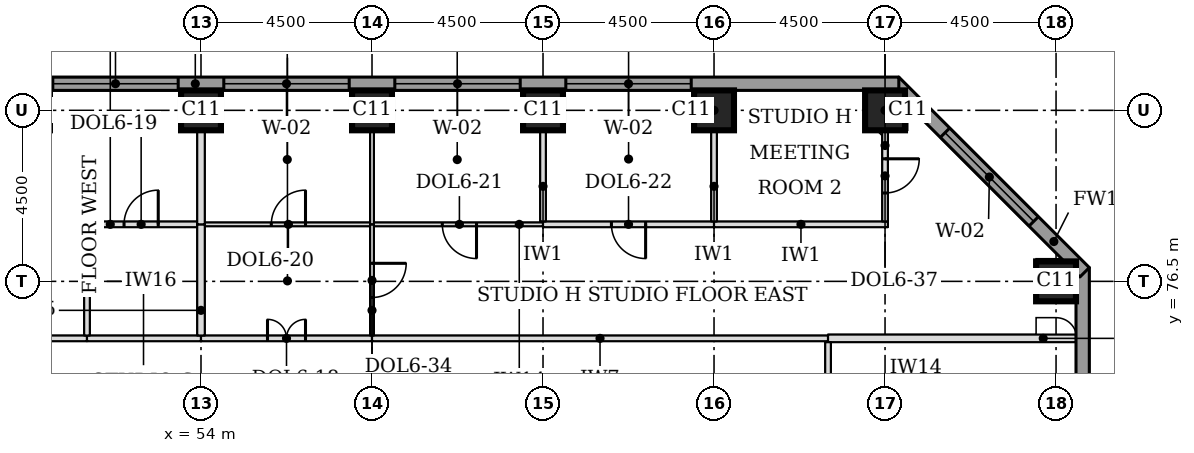
"""IFC4 building model, lengths in metres.
Left out: names, types, materials, properties, quantities, classifications, styles, units other than length and angle.
Written with IfcOpenShell. Run it as: python <this file> out.ifc"""

import sys

from ifc_helpers import new_model, si_unit, direction, frame, frame_2d, origin, origin_2d, place, context, subcontext, project, spatial, rectangle, extrude, element, fill, save


model = new_model("IFC4")
c1 = context("Model", 3, precision=1e-05, world=origin(), true_north=direction((0.0, 1.0)))
c2 = subcontext(c1, "Body", "Model", "MODEL_VIEW")
j1 = project(units=[si_unit("LENGTHUNIT", "METRE"), si_unit("PLANEANGLEUNIT", "RADIAN")], contexts=[c1])
p1 = place(None, origin())
s1 = spatial("IfcSite", under=j1, at=p1, CompositionType="ELEMENT")
p2 = place(p1, origin())
s2 = spatial("IfcBuilding", under=s1, at=p2, CompositionType="ELEMENT")
p3 = place(p2, frame((0.0, 0.0, 119.6)))
s3 = spatial("IfcBuildingStorey", under=s2, at=p3, CompositionType="ELEMENT", Elevation=119.6)
for number, where, z_axis, x_axis in (
    (1, (76.5, 76.5, 0.0), (0.0, 0.0, 1.0), (1.0, 0.0, 0.0)),
    (2, (54.0, 81.0, 0.0), (0.0, 0.0, 1.0), (1.0, 0.0, 0.0)),
    (3, (58.5, 81.0, 0.0), (0.0, 0.0, 1.0), (1.0, 0.0, 0.0)),
    (4, (63.0, 81.0, 0.0), (0.0, 0.0, 1.0), (1.0, 0.0, 0.0)),
    (5, (67.5, 81.0, 0.0), (0.0, 0.0, 1.0), (1.0, 0.0, 0.0)),
    (6, (72.0, 81.0, 0.0), (0.0, 0.0, 1.0), (1.0, 0.0, 0.0)),
):
    element("IfcColumn", number, at=place(p3, frame(where, z_axis=z_axis, x_axis=x_axis)), inside=s3, PredefinedType="COLUMN", context=c2, shape_type="SweptSolid", body=[
        extrude(rectangle(XDim=1.05, YDim=1.05, at=origin_2d()), origin(), (0.0, 0.0, 1.0), 3.7),
    ])
p4 = place(p3, frame((77.2, 44.638, 0.0), z_axis=(0.0, 0.0, 1.0), x_axis=(0.0, 1.0, 0.0)))
e7 = element("IfcWall", 7, at=p4, inside=s3, PredefinedType="STANDARD", context=c2, shape_type="SweptSolid", body=[
    extrude(rectangle(XDim=32.225, YDim=0.35, at=frame_2d((16.112, 0.0))), origin(), (0.0, 0.0, 1.0), 3.525),
])
p5 = place(p4, frame((5.462, 0.0, 0.9)))
e8 = element("IfcOpeningElement", 8, at=p5, cuts=e7, PredefinedType="OPENING", context=c2, shape_type="SweptSolid", body=[
    extrude(rectangle(XDim=3.3, YDim=1.9, at=frame_2d((1.65, 0.95))), frame((0.0, 0.185, 0.0), z_axis=(0.0, -1.0, 0.0), x_axis=(1.0, 0.0, 0.0)), (0.0, 0.0, 1.0), 0.37),
])
p6 = place(p4, frame((9.962, 0.0, 0.9)))
e9 = element("IfcOpeningElement", 9, at=p6, cuts=e7, PredefinedType="OPENING", context=c2, shape_type="SweptSolid", body=[
    extrude(rectangle(XDim=3.3, YDim=1.9, at=frame_2d((1.65, 0.95))), frame((0.0, 0.185, 0.0), z_axis=(0.0, -1.0, 0.0), x_axis=(1.0, 0.0, 0.0)), (0.0, 0.0, 1.0), 0.37),
])
p7 = place(p4, frame((14.462, 0.0, 0.9)))
e10 = element("IfcOpeningElement", 10, at=p7, cuts=e7, PredefinedType="OPENING", context=c2, shape_type="SweptSolid", body=[
    extrude(rectangle(XDim=3.3, YDim=1.9, at=frame_2d((1.65, 0.95))), frame((0.0, 0.185, 0.0), z_axis=(0.0, -1.0, 0.0), x_axis=(1.0, 0.0, 0.0)), (0.0, 0.0, 1.0), 0.37),
])
p8 = place(p4, frame((18.962, 0.0, 0.9)))
e11 = element("IfcOpeningElement", 11, at=p8, cuts=e7, PredefinedType="OPENING", context=c2, shape_type="SweptSolid", body=[
    extrude(rectangle(XDim=3.3, YDim=1.9, at=frame_2d((1.65, 0.95))), frame((0.0, 0.185, 0.0), z_axis=(0.0, -1.0, 0.0), x_axis=(1.0, 0.0, 0.0)), (0.0, 0.0, 1.0), 0.37),
])
p9 = place(p4, frame((23.462, 0.0, 0.9)))
e12 = element("IfcOpeningElement", 12, at=p9, cuts=e7, PredefinedType="OPENING", context=c2, shape_type="SweptSolid", body=[
    extrude(rectangle(XDim=3.3, YDim=1.9, at=frame_2d((1.65, 0.95))), frame((0.0, 0.185, 0.0), z_axis=(0.0, -1.0, 0.0), x_axis=(1.0, 0.0, 0.0)), (0.0, 0.0, 1.0), 0.37),
])
p10 = place(p3, frame((77.251, 76.739, 0.0), z_axis=(0.0, 0.0, 1.0), x_axis=(-0.707106781187, 0.707106781187, 0.0)))
e13 = element("IfcWall", 13, at=p10, inside=s3, PredefinedType="STANDARD", context=c2, shape_type="SweptSolid", body=[
    extrude(rectangle(XDim=7.089, YDim=0.35, at=frame_2d((3.544, 0.0))), origin(), (0.0, 0.0, 1.0), 3.525),
])
p11 = place(p10, frame((1.894, 0.0, 0.9)))
e14 = element("IfcOpeningElement", 14, at=p11, cuts=e13, PredefinedType="OPENING", context=c2, shape_type="SweptSolid", body=[
    extrude(rectangle(XDim=3.3, YDim=1.9, at=frame_2d((1.65, 0.95))), frame((0.0, 0.185, 0.0), z_axis=(0.0, -1.0, 0.0), x_axis=(1.0, 0.0, 0.0)), (0.0, 0.0, 1.0), 0.37),
])
p12 = place(p3, frame((72.362, 81.7, 0.0), z_axis=(0.0, 0.0, 1.0), x_axis=(-1.0, 0.0, 0.0)))
e15 = element("IfcWall", 15, at=p12, inside=s3, PredefinedType="STANDARD", context=c2, shape_type="SweptSolid", body=[
    extrude(rectangle(XDim=32.225, YDim=0.35, at=frame_2d((16.112, 0.0))), origin(), (0.0, 0.0, 1.0), 3.525),
])
p13 = place(p12, frame((5.462, 0.0, 0.9)))
e16 = element("IfcOpeningElement", 16, at=p13, cuts=e15, PredefinedType="OPENING", context=c2, shape_type="SweptSolid", body=[
    extrude(rectangle(XDim=3.3, YDim=1.9, at=frame_2d((1.65, 0.95))), frame((0.0, 0.185, 0.0), z_axis=(0.0, -1.0, 0.0), x_axis=(1.0, 0.0, 0.0)), (0.0, 0.0, 1.0), 0.37),
])
p14 = place(p12, frame((9.962, 0.0, 0.9)))
e17 = element("IfcOpeningElement", 17, at=p14, cuts=e15, PredefinedType="OPENING", context=c2, shape_type="SweptSolid", body=[
    extrude(rectangle(XDim=3.3, YDim=1.9, at=frame_2d((1.65, 0.95))), frame((0.0, 0.185, 0.0), z_axis=(0.0, -1.0, 0.0), x_axis=(1.0, 0.0, 0.0)), (0.0, 0.0, 1.0), 0.37),
])
p15 = place(p12, frame((14.462, 0.0, 0.9)))
e18 = element("IfcOpeningElement", 18, at=p15, cuts=e15, PredefinedType="OPENING", context=c2, shape_type="SweptSolid", body=[
    extrude(rectangle(XDim=3.3, YDim=1.9, at=frame_2d((1.65, 0.95))), frame((0.0, 0.185, 0.0), z_axis=(0.0, -1.0, 0.0), x_axis=(1.0, 0.0, 0.0)), (0.0, 0.0, 1.0), 0.37),
])
p16 = place(p12, frame((18.962, 0.0, 0.9)))
e19 = element("IfcOpeningElement", 19, at=p16, cuts=e15, PredefinedType="OPENING", context=c2, shape_type="SweptSolid", body=[
    extrude(rectangle(XDim=3.3, YDim=1.9, at=frame_2d((1.65, 0.95))), frame((0.0, 0.185, 0.0), z_axis=(0.0, -1.0, 0.0), x_axis=(1.0, 0.0, 0.0)), (0.0, 0.0, 1.0), 0.37),
])
p17 = place(p12, frame((23.462, 0.0, 0.9)))
e20 = element("IfcOpeningElement", 20, at=p17, cuts=e15, PredefinedType="OPENING", context=c2, shape_type="SweptSolid", body=[
    extrude(rectangle(XDim=3.3, YDim=1.9, at=frame_2d((1.65, 0.95))), frame((0.0, 0.185, 0.0), z_axis=(0.0, -1.0, 0.0), x_axis=(1.0, 0.0, 0.0)), (0.0, 0.0, 1.0), 0.37),
])
p18 = place(p3, frame((46.5, 75.0, 0.0), z_axis=(0.0, 0.0, 1.0), x_axis=(1.0, 0.0, 0.0)))
e21 = element("IfcWall", 21, at=p18, inside=s3, PredefinedType="PARTITIONING", context=c2, shape_type="SweptSolid", body=[
    extrude(rectangle(XDim=4.5, YDim=0.15, at=frame_2d((2.25, 0.0))), origin(), (0.0, 0.0, 1.0), 3.55),
])
p19 = place(p3, frame((51.0, 75.0, 0.0), z_axis=(0.0, 0.0, 1.0), x_axis=(1.0, 0.0, 0.0)))
e22 = element("IfcWall", 22, at=p19, inside=s3, PredefinedType="PARTITIONING", context=c2, shape_type="SweptSolid", body=[
    extrude(rectangle(XDim=3.0, YDim=0.15, at=frame_2d((1.5, 0.0))), origin(), (0.0, 0.0, 1.0), 3.55),
])
p20 = place(p3, frame((54.0, 75.0, 0.0), z_axis=(0.0, 0.0, 1.0), x_axis=(1.0, 0.0, 0.0)))
e23 = element("IfcWall", 23, at=p20, inside=s3, PredefinedType="PARTITIONING", context=c2, shape_type="SweptSolid", body=[
    extrude(rectangle(XDim=4.5, YDim=0.15, at=frame_2d((2.25, 0.0))), origin(), (0.0, 0.0, 1.0), 3.55),
])
p21 = place(p20, frame((1.75, 0.0, 0.0)))
e24 = element("IfcOpeningElement", 24, at=p21, cuts=e23, PredefinedType="OPENING", context=c2, shape_type="SweptSolid", body=[
    extrude(rectangle(XDim=1.0, YDim=2.1, at=frame_2d((0.5, 1.05))), frame((0.0, 0.085, 0.0), z_axis=(0.0, -1.0, 0.0), x_axis=(1.0, 0.0, 0.0)), (0.0, 0.0, 1.0), 0.17),
])
p22 = place(p3, frame((58.5, 75.0, 0.0), z_axis=(0.0, 0.0, 1.0), x_axis=(1.0, 0.0, 0.0)))
e25 = element("IfcWall", 25, at=p22, inside=s3, PredefinedType="PARTITIONING", context=c2, shape_type="SweptSolid", body=[
    extrude(rectangle(XDim=12.0, YDim=0.15, at=frame_2d((6.0, 0.0))), origin(), (0.0, 0.0, 1.0), 3.55),
])
p23 = place(p3, frame((70.5, 75.0, 0.0), z_axis=(0.0, 0.0, 1.0), x_axis=(1.0, 0.0, 0.0)))
e26 = element("IfcWall", 26, at=p23, inside=s3, PredefinedType="PARTITIONING", context=c2, shape_type="SweptSolid", body=[
    extrude(rectangle(XDim=6.525, YDim=0.2, at=frame_2d((3.262, 0.0))), origin(), (0.0, 0.0, 1.0), 3.55),
])
p24 = place(p3, frame((50.925, 78.0, 0.0), z_axis=(0.0, 0.0, 1.0), x_axis=(1.0, 0.0, 0.0)))
e27 = element("IfcWall", 27, at=p24, inside=s3, PredefinedType="PARTITIONING", context=c2, shape_type="SweptSolid", body=[
    extrude(rectangle(XDim=2.975, YDim=0.15, at=frame_2d((1.487, 0.0))), origin(), (0.0, 0.0, 1.0), 3.55),
])
p25 = place(p24, frame((1.05, 0.0, 0.0)))
e28 = element("IfcOpeningElement", 28, at=p25, cuts=e27, PredefinedType="OPENING", context=c2, shape_type="SweptSolid", body=[
    extrude(rectangle(XDim=0.9, YDim=2.1, at=frame_2d((0.45, 1.05))), frame((0.0, 0.085, 0.0), z_axis=(0.0, -1.0, 0.0), x_axis=(1.0, 0.0, 0.0)), (0.0, 0.0, 1.0), 0.17),
])
p26 = place(p3, frame((54.1, 78.0, 0.0), z_axis=(0.0, 0.0, 1.0), x_axis=(1.0, 0.0, 0.0)))
e29 = element("IfcWall", 29, at=p26, inside=s3, PredefinedType="PARTITIONING", context=c2, shape_type="SweptSolid", body=[
    extrude(rectangle(XDim=4.35, YDim=0.1, at=frame_2d((2.175, 0.0))), origin(), (0.0, 0.0, 1.0), 3.55),
])
p27 = place(p26, frame((1.75, 0.0, 0.0)))
e30 = element("IfcOpeningElement", 30, at=p27, cuts=e29, PredefinedType="OPENING", context=c2, shape_type="SweptSolid", body=[
    extrude(rectangle(XDim=0.9, YDim=2.1, at=frame_2d((0.45, 1.05))), frame((0.0, 0.06, 0.0), z_axis=(0.0, -1.0, 0.0), x_axis=(1.0, 0.0, 0.0)), (0.0, 0.0, 1.0), 0.12),
])
p28 = place(p3, frame((58.55, 78.0, 0.0), z_axis=(0.0, 0.0, 1.0), x_axis=(1.0, 0.0, 0.0)))
e31 = element("IfcWall", 31, at=p28, inside=s3, PredefinedType="PARTITIONING", context=c2, shape_type="SweptSolid", body=[
    extrude(rectangle(XDim=4.45, YDim=0.1, at=frame_2d((2.225, 0.0))), origin(), (0.0, 0.0, 1.0), 3.55),
])
p29 = place(p28, frame((1.8, 0.0, 0.0)))
e32 = element("IfcOpeningElement", 32, at=p29, cuts=e31, PredefinedType="OPENING", context=c2, shape_type="SweptSolid", body=[
    extrude(rectangle(XDim=0.9, YDim=2.1, at=frame_2d((0.45, 1.05))), frame((0.0, 0.06, 0.0), z_axis=(0.0, -1.0, 0.0), x_axis=(1.0, 0.0, 0.0)), (0.0, 0.0, 1.0), 0.12),
])
p30 = place(p3, frame((63.0, 78.0, 0.0), z_axis=(0.0, 0.0, 1.0), x_axis=(1.0, 0.0, 0.0)))
e33 = element("IfcWall", 33, at=p30, inside=s3, PredefinedType="PARTITIONING", context=c2, shape_type="SweptSolid", body=[
    extrude(rectangle(XDim=4.5, YDim=0.15, at=frame_2d((2.25, 0.0))), origin(), (0.0, 0.0, 1.0), 3.55),
])
p31 = place(p30, frame((1.8, 0.0, 0.0)))
e34 = element("IfcOpeningElement", 34, at=p31, cuts=e33, PredefinedType="OPENING", context=c2, shape_type="SweptSolid", body=[
    extrude(rectangle(XDim=0.9, YDim=2.1, at=frame_2d((0.45, 1.05))), frame((0.0, 0.085, 0.0), z_axis=(0.0, -1.0, 0.0), x_axis=(1.0, 0.0, 0.0)), (0.0, 0.0, 1.0), 0.17),
])
p32 = place(p3, frame((67.5, 78.0, 0.0), z_axis=(0.0, 0.0, 1.0), x_axis=(1.0, 0.0, 0.0)))
e35 = element("IfcWall", 35, at=p32, inside=s3, PredefinedType="PARTITIONING", context=c2, shape_type="SweptSolid", body=[
    extrude(rectangle(XDim=4.575, YDim=0.15, at=frame_2d((2.288, 0.0))), origin(), (0.0, 0.0, 1.0), 3.55),
])
p33 = place(p3, frame((70.5, 64.5, 0.0), z_axis=(0.0, 0.0, 1.0), x_axis=(0.0, 1.0, 0.0)))
e36 = element("IfcWall", 36, at=p33, inside=s3, PredefinedType="PARTITIONING", context=c2, shape_type="SweptSolid", body=[
    extrude(rectangle(XDim=10.4, YDim=0.15, at=frame_2d((5.2, 0.0))), origin(), (0.0, 0.0, 1.0), 3.55),
])
p34 = place(p3, frame((51.0, 75.075, 0.0), z_axis=(0.0, 0.0, 1.0), x_axis=(0.0, 1.0, 0.0)))
e37 = element("IfcWall", 37, at=p34, inside=s3, PredefinedType="PARTITIONING", context=c2, shape_type="SweptSolid", body=[
    extrude(rectangle(XDim=2.85, YDim=0.15, at=frame_2d((1.425, 0.0))), origin(), (0.0, 0.0, 1.0), 3.55),
])
p35 = place(p3, frame((54.0, 75.075, 0.0), z_axis=(0.0, 0.0, 1.0), x_axis=(0.0, 1.0, 0.0)))
e38 = element("IfcWall", 38, at=p35, inside=s3, PredefinedType="PARTITIONING", context=c2, shape_type="SweptSolid", body=[
    extrude(rectangle(XDim=2.925, YDim=0.2, at=frame_2d((1.462, 0.0))), origin(), (0.0, 0.0, 1.0), 3.55),
])
p36 = place(p3, frame((58.5, 75.075, 0.0), z_axis=(0.0, 0.0, 1.0), x_axis=(0.0, 1.0, 0.0)))
e39 = element("IfcWall", 39, at=p36, inside=s3, PredefinedType="PARTITIONING", context=c2, shape_type="SweptSolid", body=[
    extrude(rectangle(XDim=2.925, YDim=0.1, at=frame_2d((1.462, 0.0))), origin(), (0.0, 0.0, 1.0), 3.55),
])
p37 = place(p36, frame((1.0, 0.0, 0.0)))
e40 = element("IfcOpeningElement", 40, at=p37, cuts=e39, PredefinedType="OPENING", context=c2, shape_type="SweptSolid", body=[
    extrude(rectangle(XDim=0.9, YDim=2.1, at=frame_2d((0.45, 1.05))), frame((0.0, 0.06, 0.0), z_axis=(0.0, -1.0, 0.0), x_axis=(1.0, 0.0, 0.0)), (0.0, 0.0, 1.0), 0.12),
])
p38 = place(p3, frame((54.0, 78.0, 0.0), z_axis=(0.0, 0.0, 1.0), x_axis=(0.0, 1.0, 0.0)))
e41 = element("IfcWall", 41, at=p38, inside=s3, PredefinedType="PARTITIONING", context=c2, shape_type="SweptSolid", body=[
    extrude(rectangle(XDim=3.525, YDim=0.2, at=frame_2d((1.762, 0.0))), origin(), (0.0, 0.0, 1.0), 3.55),
])
p39 = place(p3, frame((58.5, 78.0, 0.0), z_axis=(0.0, 0.0, 1.0), x_axis=(0.0, 1.0, 0.0)))
e42 = element("IfcWall", 42, at=p39, inside=s3, PredefinedType="PARTITIONING", context=c2, shape_type="SweptSolid", body=[
    extrude(rectangle(XDim=3.525, YDim=0.1, at=frame_2d((1.762, 0.0))), origin(), (0.0, 0.0, 1.0), 3.55),
])
for number, where, z_axis, x_axis in (
    (43, (63.0, 78.075, 0.0), (0.0, 0.0, 1.0), (0.0, 1.0, 0.0)),
    (44, (67.5, 78.075, 0.0), (0.0, 0.0, 1.0), (0.0, 1.0, 0.0)),
):
    element("IfcWall", number, at=place(p3, frame(where, z_axis=z_axis, x_axis=x_axis)), inside=s3, PredefinedType="PARTITIONING", context=c2, shape_type="SweptSolid", body=[
        extrude(rectangle(XDim=3.45, YDim=0.15, at=frame_2d((1.725, 0.0))), origin(), (0.0, 0.0, 1.0), 3.55),
    ])
p40 = place(p3, frame((72.0, 78.075, 0.0), z_axis=(0.0, 0.0, 1.0), x_axis=(0.0, 1.0, 0.0)))
e45 = element("IfcWall", 45, at=p40, inside=s3, PredefinedType="PARTITIONING", context=c2, shape_type="SweptSolid", body=[
    extrude(rectangle(XDim=2.4, YDim=0.15, at=frame_2d((1.2, 0.0))), origin(), (0.0, 0.0, 1.0), 3.55),
])
p41 = place(p40, frame((0.75, 0.0, 0.0)))
e46 = element("IfcOpeningElement", 46, at=p41, cuts=e45, PredefinedType="OPENING", context=c2, shape_type="SweptSolid", body=[
    extrude(rectangle(XDim=0.9, YDim=2.1, at=frame_2d((0.45, 1.05))), frame((0.0, 0.085, 0.0), z_axis=(0.0, -1.0, 0.0), x_axis=(1.0, 0.0, 0.0)), (0.0, 0.0, 1.0), 0.17),
])
p42 = place(p11, origin())
e47 = element("IfcWindow", 47, at=p42, inside=s3, PartitioningType="SINGLE_PANEL", PredefinedType="WINDOW", context=c2, shape_type="SweptSolid", body=[
    extrude(rectangle(XDim=3.3, YDim=1.9, at=frame_2d((1.65, 0.95))), frame((0.0, 0.085, 0.0), z_axis=(0.0, -1.0, 0.0), x_axis=(1.0, 0.0, 0.0)), (0.0, 0.0, 1.0), 0.06),
])
fill(e14, e47)
p43 = place(p13, origin())
e48 = element("IfcWindow", 48, at=p43, inside=s3, PartitioningType="SINGLE_PANEL", PredefinedType="WINDOW", context=c2, shape_type="SweptSolid", body=[
    extrude(rectangle(XDim=3.3, YDim=1.9, at=frame_2d((1.65, 0.95))), frame((0.0, 0.085, 0.0), z_axis=(0.0, -1.0, 0.0), x_axis=(1.0, 0.0, 0.0)), (0.0, 0.0, 1.0), 0.06),
])
fill(e16, e48)
p44 = place(p14, origin())
e49 = element("IfcWindow", 49, at=p44, inside=s3, PartitioningType="SINGLE_PANEL", PredefinedType="WINDOW", context=c2, shape_type="SweptSolid", body=[
    extrude(rectangle(XDim=3.3, YDim=1.9, at=frame_2d((1.65, 0.95))), frame((0.0, 0.085, 0.0), z_axis=(0.0, -1.0, 0.0), x_axis=(1.0, 0.0, 0.0)), (0.0, 0.0, 1.0), 0.06),
])
fill(e17, e49)
p45 = place(p15, origin())
e50 = element("IfcWindow", 50, at=p45, inside=s3, PartitioningType="SINGLE_PANEL", PredefinedType="WINDOW", context=c2, shape_type="SweptSolid", body=[
    extrude(rectangle(XDim=3.3, YDim=1.9, at=frame_2d((1.65, 0.95))), frame((0.0, 0.085, 0.0), z_axis=(0.0, -1.0, 0.0), x_axis=(1.0, 0.0, 0.0)), (0.0, 0.0, 1.0), 0.06),
])
fill(e18, e50)
p46 = place(p16, origin())
e51 = element("IfcWindow", 51, at=p46, inside=s3, PartitioningType="SINGLE_PANEL", PredefinedType="WINDOW", context=c2, shape_type="SweptSolid", body=[
    extrude(rectangle(XDim=3.3, YDim=1.9, at=frame_2d((1.65, 0.95))), frame((0.0, 0.085, 0.0), z_axis=(0.0, -1.0, 0.0), x_axis=(1.0, 0.0, 0.0)), (0.0, 0.0, 1.0), 0.06),
])
fill(e19, e51)
p47 = place(p25, origin())
e52 = element("IfcDoor", 52, at=p47, inside=s3, OperationType="SINGLE_SWING_RIGHT", PredefinedType="DOOR", context=c2, shape_type="SweptSolid", body=[
    extrude(rectangle(XDim=0.9, YDim=2.1, at=frame_2d((0.45, 1.05))), frame((0.0, 0.025, 0.0), z_axis=(0.0, -1.0, 0.0), x_axis=(1.0, 0.0, 0.0)), (0.0, 0.0, 1.0), 0.05),
])
fill(e28, e52)
p48 = place(p21, origin())
e53 = element("IfcDoor", 53, at=p48, inside=s3, OperationType="DOUBLE_DOOR_SINGLE_SWING", PredefinedType="DOOR", context=c2, shape_type="SweptSolid", body=[
    extrude(rectangle(XDim=1.0, YDim=2.1, at=frame_2d((0.5, 1.05))), frame((0.0, 0.025, 0.0), z_axis=(0.0, -1.0, 0.0), x_axis=(1.0, 0.0, 0.0)), (0.0, 0.0, 1.0), 0.05),
])
fill(e24, e53)
p49 = place(p37, frame((0.9, 0.0, 0.0), z_axis=(0.0, 0.0, 1.0), x_axis=(-1.0, 0.0, 0.0)))
e54 = element("IfcDoor", 54, at=p49, inside=s3, OperationType="SINGLE_SWING_LEFT", PredefinedType="DOOR", context=c2, shape_type="SweptSolid", body=[
    extrude(rectangle(XDim=0.9, YDim=2.1, at=frame_2d((0.45, 1.05))), frame((0.0, 0.025, 0.0), z_axis=(0.0, -1.0, 0.0), x_axis=(1.0, 0.0, 0.0)), (0.0, 0.0, 1.0), 0.05),
])
fill(e40, e54)
p50 = place(p27, origin())
e55 = element("IfcDoor", 55, at=p50, inside=s3, OperationType="SINGLE_SWING_RIGHT", PredefinedType="DOOR", context=c2, shape_type="SweptSolid", body=[
    extrude(rectangle(XDim=0.9, YDim=2.1, at=frame_2d((0.45, 1.05))), frame((0.0, 0.025, 0.0), z_axis=(0.0, -1.0, 0.0), x_axis=(1.0, 0.0, 0.0)), (0.0, 0.0, 1.0), 0.05),
])
fill(e30, e55)
p51 = place(p29, frame((0.9, 0.0, 0.0), z_axis=(0.0, 0.0, 1.0), x_axis=(-1.0, 0.0, 0.0)))
e56 = element("IfcDoor", 56, at=p51, inside=s3, OperationType="SINGLE_SWING_LEFT", PredefinedType="DOOR", context=c2, shape_type="SweptSolid", body=[
    extrude(rectangle(XDim=0.9, YDim=2.1, at=frame_2d((0.45, 1.05))), frame((0.0, 0.025, 0.0), z_axis=(0.0, -1.0, 0.0), x_axis=(1.0, 0.0, 0.0)), (0.0, 0.0, 1.0), 0.05),
])
fill(e32, e56)
p52 = place(p31, frame((0.9, 0.0, 0.0), z_axis=(0.0, 0.0, 1.0), x_axis=(-1.0, 0.0, 0.0)))
e57 = element("IfcDoor", 57, at=p52, inside=s3, OperationType="SINGLE_SWING_LEFT", PredefinedType="DOOR", context=c2, shape_type="SweptSolid", body=[
    extrude(rectangle(XDim=0.9, YDim=2.1, at=frame_2d((0.45, 1.05))), frame((0.0, 0.025, 0.0), z_axis=(0.0, -1.0, 0.0), x_axis=(1.0, 0.0, 0.0)), (0.0, 0.0, 1.0), 0.05),
])
fill(e34, e57)
p53 = place(p41, frame((0.9, 0.0, 0.0), z_axis=(0.0, 0.0, 1.0), x_axis=(-1.0, 0.0, 0.0)))
e58 = element("IfcDoor", 58, at=p53, inside=s3, OperationType="SINGLE_SWING_LEFT", PredefinedType="DOOR", context=c2, shape_type="SweptSolid", body=[
    extrude(rectangle(XDim=0.9, YDim=2.1, at=frame_2d((0.45, 1.05))), frame((0.0, 0.025, 0.0), z_axis=(0.0, -1.0, 0.0), x_axis=(1.0, 0.0, 0.0)), (0.0, 0.0, 1.0), 0.05),
])
fill(e46, e58)
save(model, sys.argv[1])
